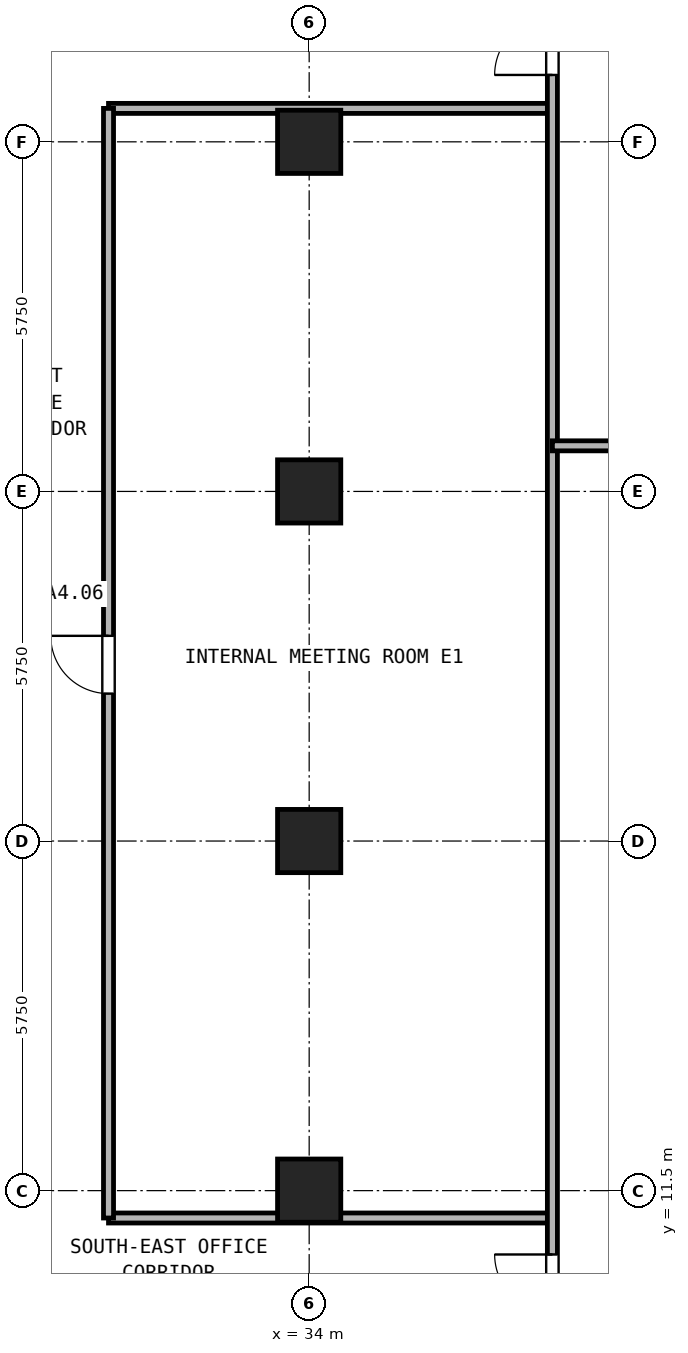
"""IFC4 building model, lengths in metres.
Left out: names, types, materials, properties, quantities, classifications, styles, units other than length and angle.
Written with IfcOpenShell. Run it as: python <this file> out.ifc"""

import sys

from ifc_helpers import new_model, si_unit, direction, frame, frame_2d, origin, origin_2d, place, context, subcontext, project, spatial, rectangle, hollow_rectangle, extrude, source, transform, mapped, element, fill, save


model = new_model("IFC4")
c1 = context("Model", 3, precision=1e-05, world=origin(), true_north=direction((0.0, 1.0)))
c2 = subcontext(c1, "Body", "Model", "MODEL_VIEW")
j1 = project(units=[si_unit("LENGTHUNIT", "METRE"), si_unit("PLANEANGLEUNIT", "RADIAN")], contexts=[c1])
p1 = place(None, origin())
s1 = spatial("IfcSite", under=j1, at=p1, CompositionType="ELEMENT")
p2 = place(p1, origin())
s2 = spatial("IfcBuilding", under=s1, at=p2, CompositionType="ELEMENT")
p3 = place(p2, frame((0.0, 0.0, 54.9)))
s3 = spatial("IfcBuildingStorey", under=s2, at=p3, CompositionType="ELEMENT", Elevation=54.9)
m1 = source(origin(), c2, "Body", "SweptSolid", [
    extrude(hollow_rectangle(XDim=1.04, YDim=1.04, WallThickness=0.065, at=origin_2d()), origin(), (0.0, 0.0, 1.0), 3.32),
])
for number, where, z_axis, x_axis in (
    (1, (34.0, 11.5, 0.0), (0.0, 0.0, 1.0), (1.0, 0.0, 0.0)),
    (2, (34.0, 17.25, 0.0), (0.0, 0.0, 1.0), (1.0, 0.0, 0.0)),
    (3, (34.0, 23.0, 0.0), (0.0, 0.0, 1.0), (1.0, 0.0, 0.0)),
    (4, (34.0, 28.75, 0.0), (0.0, 0.0, 1.0), (1.0, 0.0, 0.0)),
):
    element("IfcColumn", number, at=place(p3, frame(where, z_axis=z_axis, x_axis=x_axis)), inside=s3, PredefinedType="COLUMN", context=c2, shape_type="MappedRepresentation", body=[
        mapped(m1, transform((0.0, 0.0, 0.0), x_axis=(1.0, 0.0, 0.0), y_axis=(0.0, 1.0, 0.0), z_axis=(0.0, 0.0, 1.0), scale=1.0)),
    ])
for number, where, z_axis, x_axis in (
    (5, (30.7, 11.05, 0.0), (0.0, 0.0, 1.0), (1.0, 0.0, 0.0)),
    (6, (30.7, 29.3, 0.0), (0.0, 0.0, 1.0), (1.0, 0.0, 0.0)),
):
    element("IfcWall", number, at=place(p3, frame(where, z_axis=z_axis, x_axis=x_axis)), inside=s3, PredefinedType="PARTITIONING", context=c2, shape_type="SweptSolid", body=[
        extrude(rectangle(XDim=7.3, YDim=0.165, at=frame_2d((3.65, 0.0))), origin(), (0.0, 0.0, 1.0), 3.32),
    ])
p4 = place(p3, frame((30.7, 11.05, 0.0), z_axis=(0.0, 0.0, 1.0), x_axis=(0.0, 1.0, 0.0)))
e7 = element("IfcWall", 7, at=p4, inside=s3, PredefinedType="PARTITIONING", context=c2, shape_type="SweptSolid", body=[
    extrude(rectangle(XDim=18.25, YDim=0.165, at=frame_2d((9.125, 0.0))), origin(), (0.0, 0.0, 1.0), 3.32),
])
p5 = place(p4, frame((8.625, 0.0, 0.0)))
e8 = element("IfcOpeningElement", 8, at=p5, cuts=e7, PredefinedType="OPENING", context=c2, shape_type="SweptSolid", body=[
    extrude(rectangle(XDim=0.95, YDim=2.15, at=frame_2d((0.475, 1.075))), frame((0.0, 0.093, 0.0), z_axis=(0.0, -1.0, 0.0), x_axis=(1.0, 0.0, 0.0)), (0.0, 0.0, 1.0), 0.185),
])
p6 = place(p3, frame((38.0, 0.16, 0.0), z_axis=(0.0, 0.0, 1.0), x_axis=(0.0, 1.0, 0.0)))
e9 = element("IfcWall", 9, at=p6, inside=s3, PredefinedType="PARTITIONING", context=c2, shape_type="SweptSolid", body=[
    extrude(rectangle(XDim=40.18, YDim=0.165, at=frame_2d((20.09, 0.0))), origin(), (0.0, 0.0, 1.0), 3.32),
])
p7 = place(p6, frame((9.34, 0.0, 0.0)))
e10 = element("IfcOpeningElement", 10, at=p7, cuts=e9, PredefinedType="OPENING", context=c2, shape_type="SweptSolid", body=[
    extrude(rectangle(XDim=0.95, YDim=2.15, at=frame_2d((0.475, 1.075))), frame((0.0, 0.093, 0.0), z_axis=(0.0, -1.0, 0.0), x_axis=(1.0, 0.0, 0.0)), (0.0, 0.0, 1.0), 0.185),
])
p8 = place(p6, frame((29.69, 0.0, 0.0)))
e11 = element("IfcOpeningElement", 11, at=p8, cuts=e9, PredefinedType="OPENING", context=c2, shape_type="SweptSolid", body=[
    extrude(rectangle(XDim=0.95, YDim=2.15, at=frame_2d((0.475, 1.075))), frame((0.0, 0.093, 0.0), z_axis=(0.0, -1.0, 0.0), x_axis=(1.0, 0.0, 0.0)), (0.0, 0.0, 1.0), 0.185),
])
p9 = place(p3, frame((38.0, 23.75, 0.0), z_axis=(0.0, 0.0, 1.0), x_axis=(1.0, 0.0, 0.0)))
e12 = element("IfcWall", 12, at=p9, inside=s3, PredefinedType="PARTITIONING", context=c2, shape_type="SweptSolid", body=[
    extrude(rectangle(XDim=8.84, YDim=0.165, at=frame_2d((4.42, 0.0))), origin(), (0.0, 0.0, 1.0), 3.32),
])
p10 = place(p7, origin())
e13 = element("IfcDoor", 13, at=p10, inside=s3, OperationType="SINGLE_SWING_RIGHT", PredefinedType="DOOR", context=c2, shape_type="SweptSolid", body=[
    extrude(rectangle(XDim=0.95, YDim=2.15, at=frame_2d((0.475, 1.075))), frame((0.0, 0.025, 0.0), z_axis=(0.0, -1.0, 0.0), x_axis=(1.0, 0.0, 0.0)), (0.0, 0.0, 1.0), 0.05),
])
fill(e10, e13)
p11 = place(p8, origin())
e14 = element("IfcDoor", 14, at=p11, inside=s3, OperationType="SINGLE_SWING_LEFT", PredefinedType="DOOR", context=c2, shape_type="SweptSolid", body=[
    extrude(rectangle(XDim=0.95, YDim=2.15, at=frame_2d((0.475, 1.075))), frame((0.0, 0.025, 0.0), z_axis=(0.0, -1.0, 0.0), x_axis=(1.0, 0.0, 0.0)), (0.0, 0.0, 1.0), 0.05),
])
fill(e11, e14)
p12 = place(p5, origin())
e15 = element("IfcDoor", 15, at=p12, inside=s3, OperationType="SINGLE_SWING_RIGHT", PredefinedType="DOOR", context=c2, shape_type="SweptSolid", body=[
    extrude(rectangle(XDim=0.95, YDim=2.15, at=frame_2d((0.475, 1.075))), frame((0.0, 0.025, 0.0), z_axis=(0.0, -1.0, 0.0), x_axis=(1.0, 0.0, 0.0)), (0.0, 0.0, 1.0), 0.05),
])
fill(e8, e15)
save(model, sys.argv[1])
